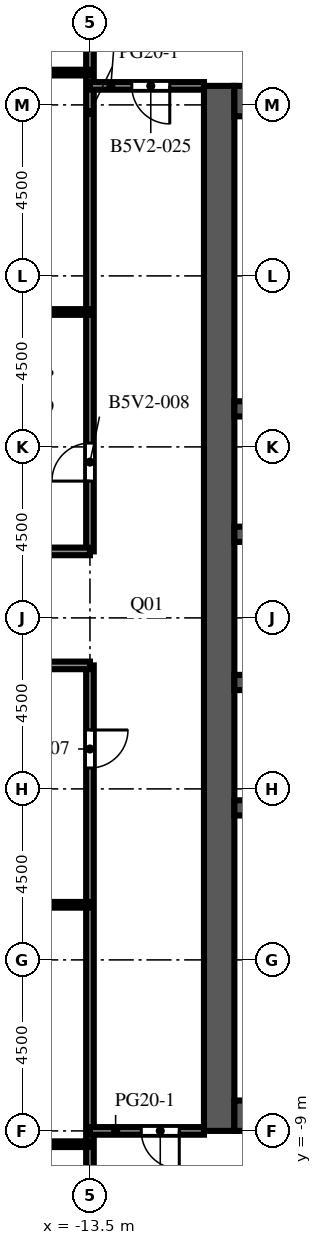
"""IFC4 building model, lengths in metres.
Left out: names, types, materials, properties, quantities, classifications, styles, units other than length and angle.
Written with IfcOpenShell. Run it as: python <this file> out.ifc"""

import sys

from ifc_helpers import new_model, si_unit, direction, frame, frame_2d, origin, place, context, subcontext, project, spatial, rectangle, extrude, element, fill, save


model = new_model("IFC4")
c1 = context("Model", 3, precision=1e-05, world=origin(), true_north=direction((0.0, 1.0)))
c2 = subcontext(c1, "Body", "Model", "MODEL_VIEW")
j1 = project(units=[si_unit("LENGTHUNIT", "METRE"), si_unit("PLANEANGLEUNIT", "RADIAN")], contexts=[c1])
p1 = place(None, origin())
s1 = spatial("IfcSite", under=j1, at=p1, CompositionType="ELEMENT")
p2 = place(p1, origin())
s2 = spatial("IfcBuilding", under=s1, at=p2, CompositionType="ELEMENT")
p3 = place(p2, frame((0.0, 0.0, 177.3)))
s3 = spatial("IfcBuildingStorey", under=s2, at=p3, CompositionType="ELEMENT", Elevation=177.3)
p4 = place(p3, frame((-10.1, -9.0, 0.0), z_axis=(0.0, 0.0, 1.0), x_axis=(0.0, 1.0, 0.0)))
e1 = element("IfcWall", 1, at=p4, inside=s3, PredefinedType="SHEAR", context=c2, shape_type="SweptSolid", body=[
    extrude(rectangle(XDim=27.5, YDim=0.8, at=frame_2d((13.75, 0.0))), origin(), (0.0, 0.0, 1.0), 4.1),
])
p5 = place(p4, frame((12.55, 0.0, 0.0)))
e2 = element("IfcOpeningElement", 2, at=p5, cuts=e1, PredefinedType="OPENING", context=c2, shape_type="SweptSolid", body=[
    extrude(rectangle(XDim=2.4, YDim=2.4, at=frame_2d((1.2, 1.2))), frame((0.0, 0.41, 0.0), z_axis=(0.0, -1.0, 0.0), x_axis=(1.0, 0.0, 0.0)), (0.0, 0.0, 1.0), 0.82),
])
p6 = place(p4, frame((6.825, 0.0, 0.0)))
e3 = element("IfcOpeningElement", 3, at=p6, cuts=e1, PredefinedType="OPENING", context=c2, shape_type="SweptSolid", body=[
    extrude(rectangle(XDim=1.2, YDim=2.1, at=frame_2d((0.6, 1.05))), frame((0.0, 0.41, 0.0), z_axis=(0.0, -1.0, 0.0), x_axis=(1.0, 0.0, 0.0)), (0.0, 0.0, 1.0), 0.82),
])
p7 = place(p4, frame((19.475, 0.0, 0.0)))
e4 = element("IfcOpeningElement", 4, at=p7, cuts=e1, PredefinedType="OPENING", context=c2, shape_type="SweptSolid", body=[
    extrude(rectangle(XDim=1.2, YDim=2.1, at=frame_2d((0.6, 1.05))), frame((0.0, 0.41, 0.0), z_axis=(0.0, -1.0, 0.0), x_axis=(1.0, 0.0, 0.0)), (0.0, 0.0, 1.0), 0.82),
])
for number, where, z_axis, x_axis in (
    (5, (-9.7, -8.6, 0.0), (0.0, 0.0, 1.0), (1.0, 0.0, 0.0)),
    (6, (-9.7, 18.1, 0.0), (0.0, 0.0, 1.0), (1.0, 0.0, 0.0)),
):
    element("IfcWall", number, at=place(p3, frame(where, z_axis=z_axis, x_axis=x_axis)), inside=s3, PredefinedType="SHEAR", context=c2, shape_type="SweptSolid", body=[
        extrude(rectangle(XDim=10.4, YDim=0.8, at=frame_2d((5.2, 0.0))), origin(), (0.0, 0.0, 1.0), 4.1),
    ])
p8 = place(p3, frame((-9.7, -0.5, 0.0), z_axis=(0.0, 0.0, 1.0), x_axis=(1.0, 0.0, 0.0)))
e7 = element("IfcWall", 7, at=p8, inside=s3, PredefinedType="SHEAR", context=c2, shape_type="SweptSolid", body=[
    extrude(rectangle(XDim=10.4, YDim=0.4, at=frame_2d((5.2, 0.0))), origin(), (0.0, 0.0, 1.0), 4.1),
])
p9 = place(p3, frame((-9.7, 2.8, 0.0), z_axis=(0.0, 0.0, 1.0), x_axis=(1.0, 0.0, 0.0)))
e8 = element("IfcWall", 8, at=p9, inside=s3, PredefinedType="SHEAR", context=c2, shape_type="SweptSolid", body=[
    extrude(rectangle(XDim=10.4, YDim=0.4, at=frame_2d((5.2, 0.0))), origin(), (0.0, 0.0, 1.0), 4.1),
])
p10 = place(p9, frame((0.738, 0.0, 0.0)))
e9 = element("IfcOpeningElement", 9, at=p10, cuts=e8, PredefinedType="OPENING", context=c2, shape_type="SweptSolid", body=[
    extrude(rectangle(XDim=1.1, YDim=2.1, at=frame_2d((0.55, 1.05))), frame((0.0, 0.21, 0.0), z_axis=(0.0, -1.0, 0.0), x_axis=(1.0, 0.0, 0.0)), (0.0, 0.0, 1.0), 0.42),
])
p11 = place(p9, frame((3.337, 0.0, 0.0)))
e10 = element("IfcOpeningElement", 10, at=p11, cuts=e8, PredefinedType="OPENING", context=c2, shape_type="SweptSolid", body=[
    extrude(rectangle(XDim=1.1, YDim=2.1, at=frame_2d((0.55, 1.05))), frame((0.0, 0.21, 0.0), z_axis=(0.0, -1.0, 0.0), x_axis=(1.0, 0.0, 0.0)), (0.0, 0.0, 1.0), 0.42),
])
p12 = place(p9, frame((6.012, 0.0, 0.0)))
e11 = element("IfcOpeningElement", 11, at=p12, cuts=e8, PredefinedType="OPENING", context=c2, shape_type="SweptSolid", body=[
    extrude(rectangle(XDim=1.0, YDim=2.1, at=frame_2d((0.5, 1.05))), frame((0.0, 0.21, 0.0), z_axis=(0.0, -1.0, 0.0), x_axis=(1.0, 0.0, 0.0)), (0.0, 0.0, 1.0), 0.42),
])
p13 = place(p9, frame((8.613, 0.0, 0.0)))
e12 = element("IfcOpeningElement", 12, at=p13, cuts=e8, PredefinedType="OPENING", context=c2, shape_type="SweptSolid", body=[
    extrude(rectangle(XDim=1.0, YDim=2.1, at=frame_2d((0.5, 1.05))), frame((0.0, 0.21, 0.0), z_axis=(0.0, -1.0, 0.0), x_axis=(1.0, 0.0, 0.0)), (0.0, 0.0, 1.0), 0.42),
])
p14 = place(p3, frame((-9.7, 6.7, 0.0), z_axis=(0.0, 0.0, 1.0), x_axis=(1.0, 0.0, 0.0)))
e13 = element("IfcWall", 13, at=p14, inside=s3, PredefinedType="SHEAR", context=c2, shape_type="SweptSolid", body=[
    extrude(rectangle(XDim=10.4, YDim=0.4, at=frame_2d((5.2, 0.0))), origin(), (0.0, 0.0, 1.0), 4.1),
])
p15 = place(p14, frame((3.337, 0.0, 0.0)))
e14 = element("IfcOpeningElement", 14, at=p15, cuts=e13, PredefinedType="OPENING", context=c2, shape_type="SweptSolid", body=[
    extrude(rectangle(XDim=1.1, YDim=2.1, at=frame_2d((0.55, 1.05))), frame((0.0, 0.21, 0.0), z_axis=(0.0, -1.0, 0.0), x_axis=(1.0, 0.0, 0.0)), (0.0, 0.0, 1.0), 0.42),
])
p16 = place(p14, frame((5.962, 0.0, 0.0)))
e15 = element("IfcOpeningElement", 15, at=p16, cuts=e13, PredefinedType="OPENING", context=c2, shape_type="SweptSolid", body=[
    extrude(rectangle(XDim=1.1, YDim=2.1, at=frame_2d((0.55, 1.05))), frame((0.0, 0.21, 0.0), z_axis=(0.0, -1.0, 0.0), x_axis=(1.0, 0.0, 0.0)), (0.0, 0.0, 1.0), 0.42),
])
p17 = place(p14, frame((8.663, 0.0, 0.0)))
e16 = element("IfcOpeningElement", 16, at=p17, cuts=e13, PredefinedType="OPENING", context=c2, shape_type="SweptSolid", body=[
    extrude(rectangle(XDim=1.1, YDim=2.1, at=frame_2d((0.55, 1.05))), frame((0.0, 0.21, 0.0), z_axis=(0.0, -1.0, 0.0), x_axis=(1.0, 0.0, 0.0)), (0.0, 0.0, 1.0), 0.42),
])
p18 = place(p14, frame((0.688, 0.0, 0.0)))
e17 = element("IfcOpeningElement", 17, at=p18, cuts=e13, PredefinedType="OPENING", context=c2, shape_type="SweptSolid", body=[
    extrude(rectangle(XDim=1.0, YDim=2.1, at=frame_2d((0.5, 1.05))), frame((0.0, 0.21, 0.0), z_axis=(0.0, -1.0, 0.0), x_axis=(1.0, 0.0, 0.0)), (0.0, 0.0, 1.0), 0.42),
])
p19 = place(p3, frame((-9.7, 10.0, 0.0), z_axis=(0.0, 0.0, 1.0), x_axis=(1.0, 0.0, 0.0)))
e18 = element("IfcWall", 18, at=p19, inside=s3, PredefinedType="SHEAR", context=c2, shape_type="SweptSolid", body=[
    extrude(rectangle(XDim=10.4, YDim=0.4, at=frame_2d((5.2, 0.0))), origin(), (0.0, 0.0, 1.0), 4.1),
])
p20 = place(p3, frame((-13.5, -26.5, 0.0), z_axis=(0.0, 0.0, 1.0), x_axis=(0.0, 1.0, 0.0)))
e19 = element("IfcWall", 19, at=p20, inside=s3, PredefinedType="PARTITIONING", context=c2, shape_type="SweptSolid", body=[
    extrude(rectangle(XDim=29.75, YDim=0.2, at=frame_2d((14.875, 0.0))), origin(), (0.0, 0.0, 1.0), 3.65),
])
p21 = place(p20, frame((27.05, 0.0, 0.0)))
e20 = element("IfcOpeningElement", 20, at=p21, cuts=e19, PredefinedType="OPENING", context=c2, shape_type="SweptSolid", body=[
    extrude(rectangle(XDim=1.0, YDim=2.1, at=frame_2d((0.5, 1.05))), frame((0.0, 0.11, 0.0), z_axis=(0.0, -1.0, 0.0), x_axis=(1.0, 0.0, 0.0)), (0.0, 0.0, 1.0), 0.22),
])
p22 = place(p3, frame((-13.5, 6.25, 0.0), z_axis=(0.0, 0.0, 1.0), x_axis=(0.0, 1.0, 0.0)))
e21 = element("IfcWall", 21, at=p22, inside=s3, PredefinedType="PARTITIONING", context=c2, shape_type="SweptSolid", body=[
    extrude(rectangle(XDim=20.25, YDim=0.2, at=frame_2d((10.125, 0.0))), origin(), (0.0, 0.0, 1.0), 3.65),
])
p23 = place(p22, frame((1.85, 0.0, 0.0)))
e22 = element("IfcOpeningElement", 22, at=p23, cuts=e21, PredefinedType="OPENING", context=c2, shape_type="SweptSolid", body=[
    extrude(rectangle(XDim=1.0, YDim=2.1, at=frame_2d((0.5, 1.05))), frame((0.0, 0.11, 0.0), z_axis=(0.0, -1.0, 0.0), x_axis=(1.0, 0.0, 0.0)), (0.0, 0.0, 1.0), 0.22),
])
p24 = place(p3, frame((-13.5, -9.35, 0.0), z_axis=(0.0, 0.0, 1.0), x_axis=(-1.0, 0.0, 0.0)))
e23 = element("IfcWall", 23, at=p24, inside=s3, PredefinedType="PARTITIONING", context=c2, shape_type="SweptSolid", body=[
    extrude(rectangle(XDim=3.9, YDim=0.15, at=frame_2d((1.95, 0.0))), origin(), (0.0, 0.0, 1.0), 3.65),
])
p25 = place(p24, frame((2.15, 0.0, 0.0)))
e24 = element("IfcOpeningElement", 24, at=p25, cuts=e23, PredefinedType="OPENING", context=c2, shape_type="SweptSolid", body=[
    extrude(rectangle(XDim=1.0, YDim=2.1, at=frame_2d((0.5, 1.05))), frame((0.0, 0.085, 0.0), z_axis=(0.0, -1.0, 0.0), x_axis=(1.0, 0.0, 0.0)), (0.0, 0.0, 1.0), 0.17),
])
p26 = place(p3, frame((-10.5, -9.0, 0.0), z_axis=(0.0, 0.0, 1.0), x_axis=(-1.0, 0.0, 0.0)))
e25 = element("IfcWall", 25, at=p26, inside=s3, PredefinedType="PARTITIONING", context=c2, shape_type="SweptSolid", body=[
    extrude(rectangle(XDim=3.0, YDim=0.2, at=frame_2d((1.5, 0.0))), origin(), (0.0, 0.0, 1.0), 3.65),
])
p27 = place(p26, frame((0.65, 0.0, 0.0)))
e26 = element("IfcOpeningElement", 26, at=p27, cuts=e25, PredefinedType="OPENING", context=c2, shape_type="SweptSolid", body=[
    extrude(rectangle(XDim=1.0, YDim=2.1, at=frame_2d((0.5, 1.05))), frame((0.0, 0.11, 0.0), z_axis=(0.0, -1.0, 0.0), x_axis=(1.0, 0.0, 0.0)), (0.0, 0.0, 1.0), 0.22),
])
p28 = place(p3, frame((-13.5, -3.05, 0.0), z_axis=(0.0, 0.0, 1.0), x_axis=(-1.0, 0.0, 0.0)))
e27 = element("IfcWall", 27, at=p28, inside=s3, PredefinedType="PARTITIONING", context=c2, shape_type="SweptSolid", body=[
    extrude(rectangle(XDim=13.35, YDim=0.15, at=frame_2d((6.675, 0.0))), origin(), (0.0, 0.0, 1.0), 3.65),
])
p29 = place(p28, frame((8.15, 0.0, 0.0)))
e28 = element("IfcOpeningElement", 28, at=p29, cuts=e27, PredefinedType="OPENING", context=c2, shape_type="SweptSolid", body=[
    extrude(rectangle(XDim=1.0, YDim=2.1, at=frame_2d((0.5, 1.05))), frame((0.0, 0.085, 0.0), z_axis=(0.0, -1.0, 0.0), x_axis=(1.0, 0.0, 0.0)), (0.0, 0.0, 1.0), 0.17),
])
p30 = place(p28, frame((2.4, 0.0, 0.0)))
e29 = element("IfcOpeningElement", 29, at=p30, cuts=e27, PredefinedType="OPENING", context=c2, shape_type="SweptSolid", body=[
    extrude(rectangle(XDim=1.0, YDim=2.1, at=frame_2d((0.5, 1.05))), frame((0.0, 0.085, 0.0), z_axis=(0.0, -1.0, 0.0), x_axis=(1.0, 0.0, 0.0)), (0.0, 0.0, 1.0), 0.17),
])
p31 = place(p3, frame((-13.5, 3.25, 0.0), z_axis=(0.0, 0.0, 1.0), x_axis=(-1.0, 0.0, 0.0)))
e30 = element("IfcWall", 30, at=p31, inside=s3, PredefinedType="PARTITIONING", context=c2, shape_type="SweptSolid", body=[
    extrude(rectangle(XDim=13.35, YDim=0.2, at=frame_2d((6.675, 0.0))), origin(), (0.0, 0.0, 1.0), 3.65),
])
p32 = place(p31, frame((8.9, 0.0, 0.0)))
e31 = element("IfcOpeningElement", 31, at=p32, cuts=e30, PredefinedType="OPENING", context=c2, shape_type="SweptSolid", body=[
    extrude(rectangle(XDim=1.0, YDim=2.1, at=frame_2d((0.5, 1.05))), frame((0.0, 0.11, 0.0), z_axis=(0.0, -1.0, 0.0), x_axis=(1.0, 0.0, 0.0)), (0.0, 0.0, 1.0), 0.22),
])
p33 = place(p3, frame((-26.85, 6.25, 0.0), z_axis=(0.0, 0.0, 1.0), x_axis=(1.0, 0.0, 0.0)))
e32 = element("IfcWall", 32, at=p33, inside=s3, PredefinedType="PARTITIONING", context=c2, shape_type="SweptSolid", body=[
    extrude(rectangle(XDim=13.35, YDim=0.2, at=frame_2d((6.675, 0.0))), origin(), (0.0, 0.0, 1.0), 3.65),
])
p34 = place(p33, frame((2.95, 0.0, 0.0)))
e33 = element("IfcOpeningElement", 33, at=p34, cuts=e32, PredefinedType="OPENING", context=c2, shape_type="SweptSolid", body=[
    extrude(rectangle(XDim=1.0, YDim=2.1, at=frame_2d((0.5, 1.05))), frame((0.0, 0.11, 0.0), z_axis=(0.0, -1.0, 0.0), x_axis=(1.0, 0.0, 0.0)), (0.0, 0.0, 1.0), 0.22),
])
p35 = place(p3, frame((-26.85, 12.55, 0.0), z_axis=(0.0, 0.0, 1.0), x_axis=(1.0, 0.0, 0.0)))
e34 = element("IfcWall", 34, at=p35, inside=s3, PredefinedType="PARTITIONING", context=c2, shape_type="SweptSolid", body=[
    extrude(rectangle(XDim=13.35, YDim=0.15, at=frame_2d((6.675, 0.0))), origin(), (0.0, 0.0, 1.0), 3.65),
])
p36 = place(p35, frame((3.7, 0.0, 0.0)))
e35 = element("IfcOpeningElement", 35, at=p36, cuts=e34, PredefinedType="OPENING", context=c2, shape_type="SweptSolid", body=[
    extrude(rectangle(XDim=1.0, YDim=2.1, at=frame_2d((0.5, 1.05))), frame((0.0, 0.085, 0.0), z_axis=(0.0, -1.0, 0.0), x_axis=(1.0, 0.0, 0.0)), (0.0, 0.0, 1.0), 0.17),
])
p37 = place(p35, frame((9.95, 0.0, 0.0)))
e36 = element("IfcOpeningElement", 36, at=p37, cuts=e34, PredefinedType="OPENING", context=c2, shape_type="SweptSolid", body=[
    extrude(rectangle(XDim=1.0, YDim=2.1, at=frame_2d((0.5, 1.05))), frame((0.0, 0.085, 0.0), z_axis=(0.0, -1.0, 0.0), x_axis=(1.0, 0.0, 0.0)), (0.0, 0.0, 1.0), 0.17),
])
p38 = place(p3, frame((-13.5, 18.5, 0.0), z_axis=(0.0, 0.0, 1.0), x_axis=(1.0, 0.0, 0.0)))
e37 = element("IfcWall", 37, at=p38, inside=s3, PredefinedType="PARTITIONING", context=c2, shape_type="SweptSolid", body=[
    extrude(rectangle(XDim=3.0, YDim=0.2, at=frame_2d((1.5, 0.0))), origin(), (0.0, 0.0, 1.0), 3.65),
])
p39 = place(p38, frame((1.1, 0.0, 0.0)))
e38 = element("IfcOpeningElement", 38, at=p39, cuts=e37, PredefinedType="OPENING", context=c2, shape_type="SweptSolid", body=[
    extrude(rectangle(XDim=1.0, YDim=2.1, at=frame_2d((0.5, 1.05))), frame((0.0, 0.11, 0.0), z_axis=(0.0, -1.0, 0.0), x_axis=(1.0, 0.0, 0.0)), (0.0, 0.0, 1.0), 0.22),
])
p40 = place(p3, frame((-26.85, 18.85, 0.0), z_axis=(0.0, 0.0, 1.0), x_axis=(1.0, 0.0, 0.0)))
e39 = element("IfcWall", 39, at=p40, inside=s3, PredefinedType="PARTITIONING", context=c2, shape_type="SweptSolid", body=[
    extrude(rectangle(XDim=13.35, YDim=0.15, at=frame_2d((6.675, 0.0))), origin(), (0.0, 0.0, 1.0), 3.65),
])
p41 = place(p40, frame((3.7, 0.0, 0.0)))
e40 = element("IfcOpeningElement", 40, at=p41, cuts=e39, PredefinedType="OPENING", context=c2, shape_type="SweptSolid", body=[
    extrude(rectangle(XDim=1.0, YDim=2.1, at=frame_2d((0.5, 1.05))), frame((0.0, 0.085, 0.0), z_axis=(0.0, -1.0, 0.0), x_axis=(1.0, 0.0, 0.0)), (0.0, 0.0, 1.0), 0.17),
])
p42 = place(p40, frame((9.95, 0.0, 0.0)))
e41 = element("IfcOpeningElement", 41, at=p42, cuts=e39, PredefinedType="OPENING", context=c2, shape_type="SweptSolid", body=[
    extrude(rectangle(XDim=1.0, YDim=2.1, at=frame_2d((0.5, 1.05))), frame((0.0, 0.085, 0.0), z_axis=(0.0, -1.0, 0.0), x_axis=(1.0, 0.0, 0.0)), (0.0, 0.0, 1.0), 0.17),
])
p43 = place(p5, origin())
e42 = element("IfcDoor", 42, at=p43, inside=s3, OperationType="DOUBLE_DOOR_DOUBLE_SWING", PredefinedType="DOOR", context=c2, shape_type="SweptSolid", body=[
    extrude(rectangle(XDim=2.4, YDim=2.4, at=frame_2d((1.2, 1.2))), frame((0.0, 0.025, 0.0), z_axis=(0.0, -1.0, 0.0), x_axis=(1.0, 0.0, 0.0)), (0.0, 0.0, 1.0), 0.05),
])
fill(e2, e42)
p44 = place(p6, origin())
e43 = element("IfcDoor", 43, at=p44, inside=s3, OperationType="SINGLE_SWING_LEFT", PredefinedType="DOOR", context=c2, shape_type="SweptSolid", body=[
    extrude(rectangle(XDim=1.2, YDim=2.1, at=frame_2d((0.6, 1.05))), frame((0.0, 0.025, 0.0), z_axis=(0.0, -1.0, 0.0), x_axis=(1.0, 0.0, 0.0)), (0.0, 0.0, 1.0), 0.05),
])
fill(e3, e43)
p45 = place(p7, origin())
e44 = element("IfcDoor", 44, at=p45, inside=s3, OperationType="SINGLE_SWING_LEFT", PredefinedType="DOOR", context=c2, shape_type="SweptSolid", body=[
    extrude(rectangle(XDim=1.2, YDim=2.1, at=frame_2d((0.6, 1.05))), frame((0.0, 0.025, 0.0), z_axis=(0.0, -1.0, 0.0), x_axis=(1.0, 0.0, 0.0)), (0.0, 0.0, 1.0), 0.05),
])
fill(e4, e44)
p46 = place(p21, origin())
e45 = element("IfcDoor", 45, at=p46, inside=s3, OperationType="SINGLE_SWING_RIGHT", PredefinedType="DOOR", context=c2, shape_type="SweptSolid", body=[
    extrude(rectangle(XDim=1.0, YDim=2.1, at=frame_2d((0.5, 1.05))), frame((0.0, 0.025, 0.0), z_axis=(0.0, -1.0, 0.0), x_axis=(1.0, 0.0, 0.0)), (0.0, 0.0, 1.0), 0.05),
])
fill(e20, e45)
p47 = place(p23, origin())
e46 = element("IfcDoor", 46, at=p47, inside=s3, OperationType="SINGLE_SWING_LEFT", PredefinedType="DOOR", context=c2, shape_type="SweptSolid", body=[
    extrude(rectangle(XDim=1.0, YDim=2.1, at=frame_2d((0.5, 1.05))), frame((0.0, 0.025, 0.0), z_axis=(0.0, -1.0, 0.0), x_axis=(1.0, 0.0, 0.0)), (0.0, 0.0, 1.0), 0.05),
])
fill(e22, e46)
p48 = place(p27, origin())
e47 = element("IfcDoor", 47, at=p48, inside=s3, OperationType="SINGLE_SWING_LEFT", PredefinedType="DOOR", context=c2, shape_type="SweptSolid", body=[
    extrude(rectangle(XDim=1.0, YDim=2.1, at=frame_2d((0.5, 1.05))), frame((0.0, 0.025, 0.0), z_axis=(0.0, -1.0, 0.0), x_axis=(1.0, 0.0, 0.0)), (0.0, 0.0, 1.0), 0.05),
])
fill(e26, e47)
p49 = place(p39, origin())
e48 = element("IfcDoor", 48, at=p49, inside=s3, OperationType="SINGLE_SWING_RIGHT", PredefinedType="DOOR", context=c2, shape_type="SweptSolid", body=[
    extrude(rectangle(XDim=1.0, YDim=2.1, at=frame_2d((0.5, 1.05))), frame((0.0, 0.025, 0.0), z_axis=(0.0, -1.0, 0.0), x_axis=(1.0, 0.0, 0.0)), (0.0, 0.0, 1.0), 0.05),
])
fill(e38, e48)
save(model, sys.argv[1])
